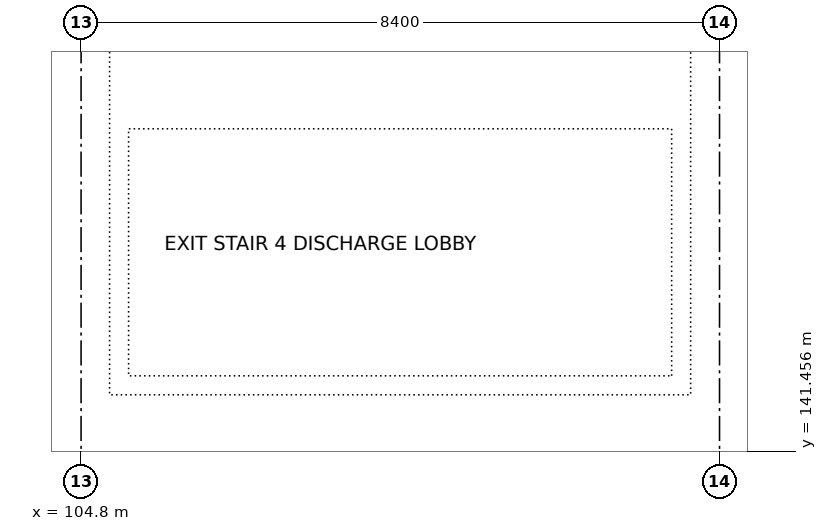
"""IFC4 building model, lengths in metres.
Left out: names, types, materials, properties, quantities, classifications, styles, units other than length and angle.
Written with IfcOpenShell. Run it as: python <this file> out.ifc"""

import sys

from ifc_helpers import new_model, si_unit, direction, frame, frame_2d, origin, place, context, subcontext, project, spatial, rectangle, extrude, element, fill, save


model = new_model("IFC4")
c1 = context("Model", 3, precision=1e-05, world=origin(), true_north=direction((0.0, 1.0)))
c2 = subcontext(c1, "Body", "Model", "MODEL_VIEW")
j1 = project(units=[si_unit("LENGTHUNIT", "METRE"), si_unit("PLANEANGLEUNIT", "RADIAN")], contexts=[c1])
p1 = place(None, origin())
s1 = spatial("IfcSite", under=j1, at=p1, CompositionType="ELEMENT")
p2 = place(p1, origin())
s2 = spatial("IfcBuilding", under=s1, at=p2, CompositionType="ELEMENT")
p3 = place(p2, origin())
s3 = spatial("IfcBuildingStorey", under=s2, at=p3, CompositionType="ELEMENT", Elevation=0.0)
p4 = place(p3, frame((105.3, 142.325, 0.0), z_axis=(0.0, 0.0, 1.0), x_axis=(1.0, 0.0, 0.0)))
e1 = element("IfcWall", 1, at=p4, inside=s3, PredefinedType="SOLIDWALL", context=c2, shape_type="SweptSolid", body=[
    extrude(rectangle(XDim=7.395, YDim=0.25, at=frame_2d((3.698, 0.0))), origin(), (0.0, 0.0, 1.0), 2.8),
])
p5 = place(p4, frame((0.55, 0.0, 0.0)))
e2 = element("IfcOpeningElement", 2, at=p5, cuts=e1, PredefinedType="OPENING", context=c2, shape_type="SweptSolid", body=[
    extrude(rectangle(XDim=1.1, YDim=2.1, at=frame_2d((0.55, 1.05))), frame((0.0, 0.135, 0.0), z_axis=(0.0, -1.0, 0.0), x_axis=(1.0, 0.0, 0.0)), (0.0, 0.0, 1.0), 0.27),
])
p6 = place(p3, frame((105.3, 145.825, 0.0), z_axis=(0.0, 0.0, 1.0), x_axis=(1.0, 0.0, 0.0)))
e3 = element("IfcWall", 3, at=p6, inside=s3, PredefinedType="SOLIDWALL", context=c2, shape_type="SweptSolid", body=[
    extrude(rectangle(XDim=7.395, YDim=0.25, at=frame_2d((3.698, 0.0))), origin(), (0.0, 0.0, 1.0), 2.8),
])
for number, where, z_axis, x_axis in (
    (4, (105.3, 142.325, 0.0), (0.0, 0.0, 1.0), (0.0, 1.0, 0.0)),
    (5, (112.695, 142.325, 0.0), (0.0, 0.0, 1.0), (0.0, 1.0, 0.0)),
):
    element("IfcWall", number, at=place(p3, frame(where, z_axis=z_axis, x_axis=x_axis)), inside=s3, PredefinedType="SOLIDWALL", context=c2, shape_type="SweptSolid", body=[
        extrude(rectangle(XDim=3.5, YDim=0.25, at=frame_2d((1.75, 0.0))), origin(), (0.0, 0.0, 1.0), 2.8),
    ])
p7 = place(p5, frame((1.1, 0.0, 0.0), z_axis=(0.0, 0.0, 1.0), x_axis=(-1.0, 0.0, 0.0)))
e6 = element("IfcDoor", 6, at=p7, inside=s3, OperationType="SINGLE_SWING_RIGHT", PredefinedType="DOOR", context=c2, shape_type="SweptSolid", body=[
    extrude(rectangle(XDim=1.1, YDim=2.1, at=frame_2d((0.55, 1.05))), frame((0.0, 0.025, 0.0), z_axis=(0.0, -1.0, 0.0), x_axis=(1.0, 0.0, 0.0)), (0.0, 0.0, 1.0), 0.05),
])
fill(e2, e6)
save(model, sys.argv[1])
